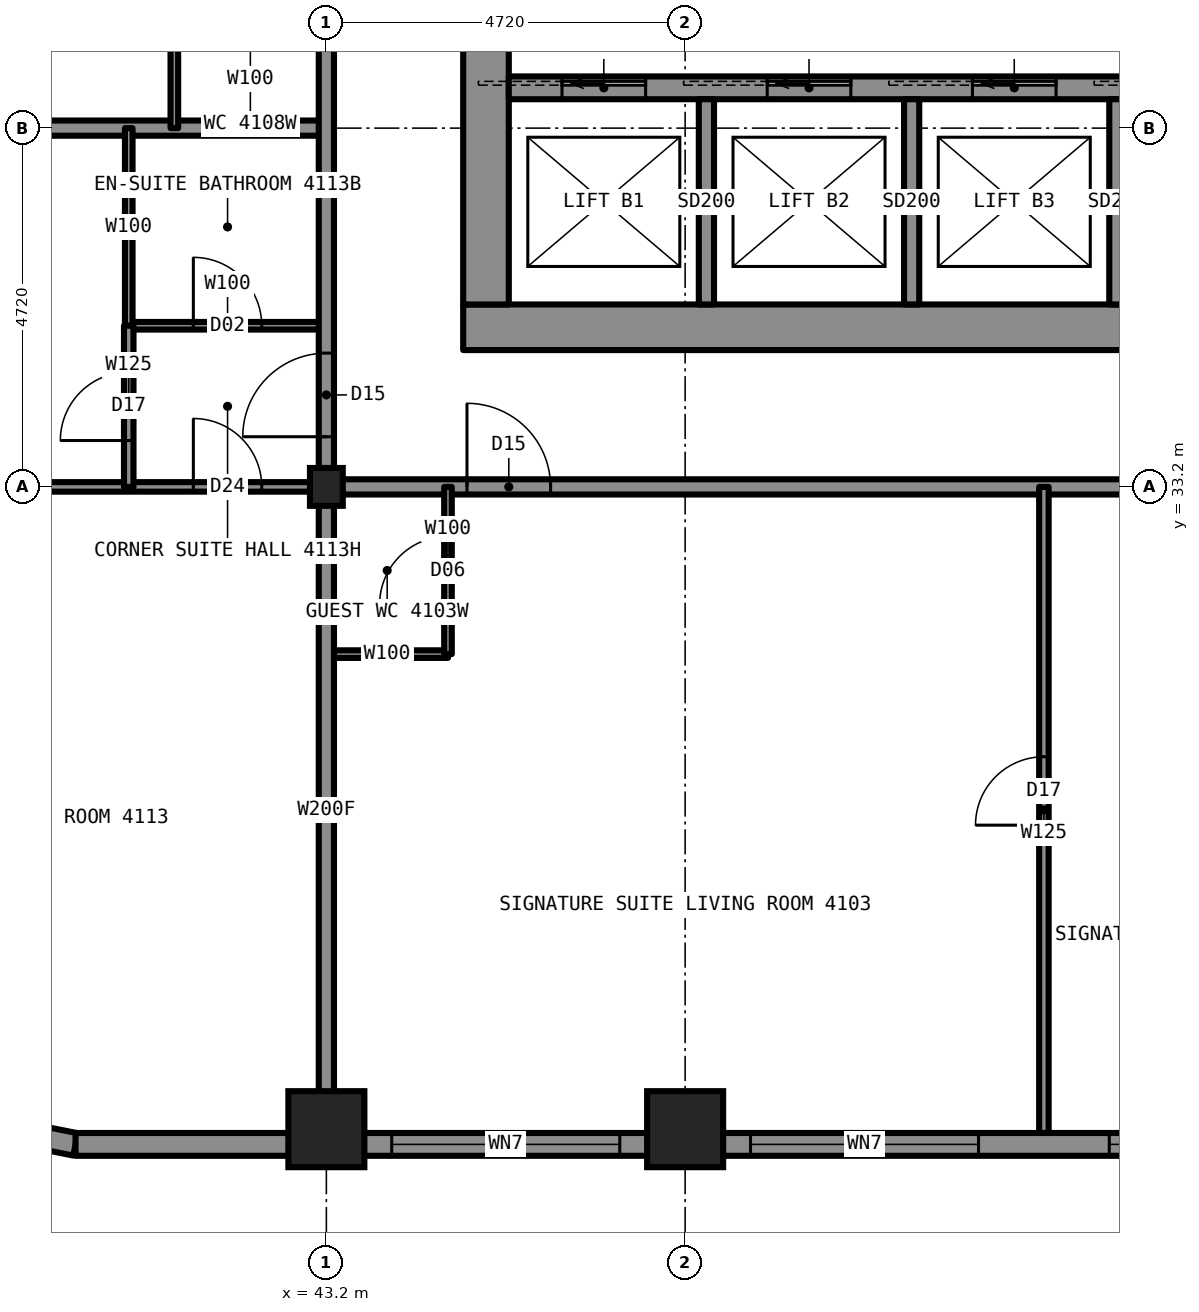
"""IFC4 building model, lengths in metres.
Left out: names, types, materials, properties, quantities, classifications, styles, units other than length and angle.
Written with IfcOpenShell. Run it as: python <this file> out.ifc"""

import sys

from ifc_helpers import new_model, si_unit, direction, frame, frame_2d, origin, origin_2d, place, context, subcontext, project, spatial, rectangle, i_section, extrude, element, fill, save


model = new_model("IFC4")
c1 = context("Model", 3, precision=1e-05, world=origin(), true_north=direction((0.0, 1.0)))
c2 = subcontext(c1, "Body", "Model", "MODEL_VIEW")
j1 = project(units=[si_unit("LENGTHUNIT", "METRE"), si_unit("PLANEANGLEUNIT", "RADIAN")], contexts=[c1])
p1 = place(None, origin())
s1 = spatial("IfcSite", under=j1, at=p1, CompositionType="ELEMENT")
p2 = place(p1, origin())
s2 = spatial("IfcBuilding", under=s1, at=p2, CompositionType="ELEMENT")
p3 = place(p2, frame((0.0, 0.0, 145.9)))
s3 = spatial("IfcBuildingStorey", under=s2, at=p3, CompositionType="ELEMENT", Elevation=145.9)
for number, where, z_axis, x_axis in (
    (1, (43.2, 24.75, 0.0), (0.0, 0.0, 1.0), (1.0, 0.0, 0.0)),
    (2, (47.92, 24.75, 0.0), (0.0, 0.0, 1.0), (1.0, 0.0, 0.0)),
):
    element("IfcColumn", number, at=place(p3, frame(where, z_axis=z_axis, x_axis=x_axis)), inside=s3, PredefinedType="COLUMN", context=c2, shape_type="SweptSolid", body=[
        extrude(i_section(OverallWidth=0.422, OverallDepth=0.465, WebThickness=0.045, FlangeThickness=0.073, at=origin_2d()), origin(), (0.0, 0.0, 1.0), 3.5),
    ])
p4 = place(p3, frame((43.2, 33.2, 0.0), z_axis=(0.0, 0.0, 1.0), x_axis=(1.0, 0.0, 0.0)))
e3 = element("IfcColumn", 3, at=p4, inside=s3, PredefinedType="COLUMN", context=c2, shape_type="SweptSolid", body=[
    extrude(i_section(OverallWidth=0.432, OverallDepth=0.498, WebThickness=0.056, FlangeThickness=0.089, at=origin_2d()), origin(), (0.0, 0.0, 1.0), 3.5),
])
p5 = place(p3, frame((45.0, 35.3, 0.0), z_axis=(0.0, 0.0, 1.0), x_axis=(1.0, 0.0, 0.0)))
e4 = element("IfcWall", 4, at=p5, inside=s3, PredefinedType="SHEAR", context=c2, shape_type="SweptSolid", body=[
    extrude(rectangle(XDim=20.0, YDim=0.6, at=frame_2d((10.0, 0.0))), origin(), (0.0, 0.0, 1.0), 3.5),
])
p6 = place(p3, frame((45.3, 35.6, 0.0), z_axis=(0.0, 0.0, 1.0), x_axis=(0.0, 1.0, 0.0)))
e5 = element("IfcWall", 5, at=p6, inside=s3, PredefinedType="SHEAR", context=c2, shape_type="SweptSolid", body=[
    extrude(rectangle(XDim=18.8, YDim=0.6, at=frame_2d((9.4, 0.0))), origin(), (0.0, 0.0, 1.0), 3.5),
])
p7 = place(p6, frame((13.4, 0.0, 0.0)))
e6 = element("IfcOpeningElement", 6, at=p7, cuts=e5, PredefinedType="OPENING", context=c2, shape_type="SweptSolid", body=[
    extrude(rectangle(XDim=1.8, YDim=2.2, at=frame_2d((0.9, 1.1))), frame((0.0, 0.31, 0.0), z_axis=(0.0, -1.0, 0.0), x_axis=(1.0, 0.0, 0.0)), (0.0, 0.0, 1.0), 0.62),
])
p8 = place(p6, frame((3.6, 0.0, 0.0)))
e7 = element("IfcOpeningElement", 7, at=p8, cuts=e5, PredefinedType="OPENING", context=c2, shape_type="SweptSolid", body=[
    extrude(rectangle(XDim=1.8, YDim=2.2, at=frame_2d((0.9, 1.1))), frame((0.0, 0.31, 0.0), z_axis=(0.0, -1.0, 0.0), x_axis=(1.0, 0.0, 0.0)), (0.0, 0.0, 1.0), 0.62),
])
p9 = place(p6, frame((6.4, 0.0, 0.0)))
e8 = element("IfcOpeningElement", 8, at=p9, cuts=e5, PredefinedType="OPENING", context=c2, shape_type="SweptSolid", body=[
    extrude(rectangle(XDim=1.2, YDim=2.2, at=frame_2d((0.6, 1.1))), frame((0.0, 0.31, 0.0), z_axis=(0.0, -1.0, 0.0), x_axis=(1.0, 0.0, 0.0)), (0.0, 0.0, 1.0), 0.62),
])
p10 = place(p3, frame((45.6, 38.45, 0.0), z_axis=(0.0, 0.0, 1.0), x_axis=(1.0, 0.0, 0.0)))
e9 = element("IfcWall", 9, at=p10, inside=s3, PredefinedType="SHEAR", context=c2, shape_type="SweptSolid", body=[
    extrude(rectangle(XDim=18.8, YDim=0.3, at=frame_2d((9.4, 0.0))), origin(), (0.0, 0.0, 1.0), 3.5),
])
p11 = place(p3, frame((43.2, 33.2, 0.0), z_axis=(0.0, 0.0, 1.0), x_axis=(1.0, 0.0, 0.0)))
e10 = element("IfcWall", 10, at=p11, inside=s3, PredefinedType="PARTITIONING", context=c2, shape_type="SweptSolid", body=[
    extrude(rectangle(XDim=23.6, YDim=0.2, at=frame_2d((11.8, 0.0))), origin(), (0.0, 0.0, 1.0), 3.33),
])
p12 = place(p11, frame((1.85, 0.0, 0.0)))
e11 = element("IfcOpeningElement", 11, at=p12, cuts=e10, PredefinedType="OPENING", context=c2, shape_type="SweptSolid", body=[
    extrude(rectangle(XDim=1.1, YDim=2.2, at=frame_2d((0.55, 1.1))), frame((0.0, 0.11, 0.0), z_axis=(0.0, -1.0, 0.0), x_axis=(1.0, 0.0, 0.0)), (0.0, 0.0, 1.0), 0.22),
])
p13 = place(p11, frame((17.16, 0.0, 0.0)))
e12 = element("IfcOpeningElement", 12, at=p13, cuts=e10, PredefinedType="OPENING", context=c2, shape_type="SweptSolid", body=[
    extrude(rectangle(XDim=1.0, YDim=2.2, at=frame_2d((0.5, 1.1))), frame((0.0, 0.11, 0.0), z_axis=(0.0, -1.0, 0.0), x_axis=(1.0, 0.0, 0.0)), (0.0, 0.0, 1.0), 0.22),
])
p14 = place(p3, frame((34.7, 33.2, 0.0), z_axis=(0.0, 0.0, 1.0), x_axis=(1.0, 0.0, 0.0)))
e13 = element("IfcWall", 13, at=p14, inside=s3, PredefinedType="PARTITIONING", context=c2, shape_type="SweptSolid", body=[
    extrude(rectangle(XDim=8.5, YDim=0.125, at=frame_2d((4.25, 0.0))), origin(), (0.0, 0.0, 1.0), 2.573),
])
p15 = place(p14, frame((6.75, 0.0, 0.0)))
e14 = element("IfcOpeningElement", 14, at=p15, cuts=e13, PredefinedType="OPENING", context=c2, shape_type="SweptSolid", body=[
    extrude(rectangle(XDim=0.9, YDim=2.2, at=frame_2d((0.45, 1.1))), frame((0.0, 0.073, 0.0), z_axis=(0.0, -1.0, 0.0), x_axis=(1.0, 0.0, 0.0)), (0.0, 0.0, 1.0), 0.145),
])
p16 = place(p3, frame((43.2, 31.0, 0.0), z_axis=(0.0, 0.0, 1.0), x_axis=(1.0, 0.0, 0.0)))
e15 = element("IfcWall", 15, at=p16, inside=s3, PredefinedType="PARTITIONING", context=c2, shape_type="SweptSolid", body=[
    extrude(rectangle(XDim=1.6, YDim=0.1, at=frame_2d((0.8, 0.0))), origin(), (0.0, 0.0, 1.0), 3.33),
])
p17 = place(p3, frame((42.6, 37.92, 0.0), z_axis=(0.0, 0.0, 1.0), x_axis=(1.0, 0.0, 0.0)))
e16 = element("IfcWall", 16, at=p17, inside=s3, PredefinedType="PARTITIONING", context=c2, shape_type="SweptSolid", body=[
    extrude(rectangle(XDim=0.6, YDim=0.2, at=frame_2d((0.3, 0.0))), origin(), (0.0, 0.0, 1.0), 2.573),
])
p18 = place(p3, frame((34.7, 37.92, 0.0), z_axis=(0.0, 0.0, 1.0), x_axis=(1.0, 0.0, 0.0)))
e17 = element("IfcWall", 17, at=p18, inside=s3, PredefinedType="PARTITIONING", context=c2, shape_type="SweptSolid", body=[
    extrude(rectangle(XDim=7.9, YDim=0.2, at=frame_2d((3.95, 0.0))), origin(), (0.0, 0.0, 1.0), 2.573),
])
p19 = place(p3, frame((40.6, 35.32, 0.0), z_axis=(0.0, 0.0, 1.0), x_axis=(1.0, 0.0, 0.0)))
e18 = element("IfcWall", 18, at=p19, inside=s3, PredefinedType="PARTITIONING", context=c2, shape_type="SweptSolid", body=[
    extrude(rectangle(XDim=2.6, YDim=0.1, at=frame_2d((1.3, 0.0))), origin(), (0.0, 0.0, 1.0), 3.33),
])
p20 = place(p19, frame((0.85, 0.0, 0.0)))
e19 = element("IfcOpeningElement", 19, at=p20, cuts=e18, PredefinedType="OPENING", context=c2, shape_type="SweptSolid", body=[
    extrude(rectangle(XDim=0.9, YDim=2.1, at=frame_2d((0.45, 1.05))), frame((0.0, 0.06, 0.0), z_axis=(0.0, -1.0, 0.0), x_axis=(1.0, 0.0, 0.0)), (0.0, 0.0, 1.0), 0.12),
])
p21 = place(p3, frame((44.8, 31.0, 0.0), z_axis=(0.0, 0.0, 1.0), x_axis=(0.0, 1.0, 0.0)))
e20 = element("IfcWall", 20, at=p21, inside=s3, PredefinedType="PARTITIONING", context=c2, shape_type="SweptSolid", body=[
    extrude(rectangle(XDim=2.2, YDim=0.1, at=frame_2d((1.1, 0.0))), origin(), (0.0, 0.0, 1.0), 3.33),
])
p22 = place(p21, frame((0.65, 0.0, 0.0)))
e21 = element("IfcOpeningElement", 21, at=p22, cuts=e20, PredefinedType="OPENING", context=c2, shape_type="SweptSolid", body=[
    extrude(rectangle(XDim=0.9, YDim=2.1, at=frame_2d((0.45, 1.05))), frame((0.0, 0.06, 0.0), z_axis=(0.0, -1.0, 0.0), x_axis=(1.0, 0.0, 0.0)), (0.0, 0.0, 1.0), 0.12),
])
p23 = place(p3, frame((43.2, 33.2, 0.0), z_axis=(0.0, 0.0, 1.0), x_axis=(0.0, 1.0, 0.0)))
e22 = element("IfcWall", 22, at=p23, inside=s3, PredefinedType="PARTITIONING", context=c2, shape_type="SweptSolid", body=[
    extrude(rectangle(XDim=4.72, YDim=0.2, at=frame_2d((2.36, 0.0))), origin(), (0.0, 0.0, 1.0), 3.33),
])
p24 = place(p23, frame((0.66, 0.0, 0.0)))
e23 = element("IfcOpeningElement", 23, at=p24, cuts=e22, PredefinedType="OPENING", context=c2, shape_type="SweptSolid", body=[
    extrude(rectangle(XDim=1.1, YDim=2.2, at=frame_2d((0.55, 1.1))), frame((0.0, 0.11, 0.0), z_axis=(0.0, -1.0, 0.0), x_axis=(1.0, 0.0, 0.0)), (0.0, 0.0, 1.0), 0.22),
])
p25 = place(p3, frame((43.2, 24.7, 0.0), z_axis=(0.0, 0.0, 1.0), x_axis=(0.0, 1.0, 0.0)))
e24 = element("IfcWall", 24, at=p25, inside=s3, PredefinedType="PARTITIONING", context=c2, shape_type="SweptSolid", body=[
    extrude(rectangle(XDim=8.5, YDim=0.2, at=frame_2d((4.25, 0.0))), origin(), (0.0, 0.0, 1.0), 2.573),
])
p26 = place(p3, frame((42.6, 37.92, 0.0), z_axis=(0.0, 0.0, 1.0), x_axis=(0.0, 1.0, 0.0)))
e25 = element("IfcWall", 25, at=p26, inside=s3, PredefinedType="PARTITIONING", context=c2, shape_type="SweptSolid", body=[
    extrude(rectangle(XDim=14.16, YDim=0.2, at=frame_2d((7.08, 0.0))), origin(), (0.0, 0.0, 1.0), 3.33),
])
p27 = place(p26, frame((1.46, 0.0, 0.0)))
e26 = element("IfcOpeningElement", 26, at=p27, cuts=e25, PredefinedType="OPENING", context=c2, shape_type="SweptSolid", body=[
    extrude(rectangle(XDim=1.0, YDim=2.2, at=frame_2d((0.5, 1.1))), frame((0.0, 0.11, 0.0), z_axis=(0.0, -1.0, 0.0), x_axis=(1.0, 0.0, 0.0)), (0.0, 0.0, 1.0), 0.22),
])
p28 = place(p26, frame((6.18, 0.0, 0.0)))
e27 = element("IfcOpeningElement", 27, at=p28, cuts=e25, PredefinedType="OPENING", context=c2, shape_type="SweptSolid", body=[
    extrude(rectangle(XDim=1.0, YDim=2.2, at=frame_2d((0.5, 1.1))), frame((0.0, 0.11, 0.0), z_axis=(0.0, -1.0, 0.0), x_axis=(1.0, 0.0, 0.0)), (0.0, 0.0, 1.0), 0.22),
])
p29 = place(p26, frame((11.7, 0.0, 0.0)))
e28 = element("IfcOpeningElement", 28, at=p29, cuts=e25, PredefinedType="OPENING", context=c2, shape_type="SweptSolid", body=[
    extrude(rectangle(XDim=1.0, YDim=2.2, at=frame_2d((0.5, 1.1))), frame((0.0, 0.11, 0.0), z_axis=(0.0, -1.0, 0.0), x_axis=(1.0, 0.0, 0.0)), (0.0, 0.0, 1.0), 0.22),
])
p30 = place(p3, frame((40.6, 35.32, 0.0), z_axis=(0.0, 0.0, 1.0), x_axis=(0.0, 1.0, 0.0)))
e29 = element("IfcWall", 29, at=p30, inside=s3, PredefinedType="PARTITIONING", context=c2, shape_type="SweptSolid", body=[
    extrude(rectangle(XDim=3.8, YDim=0.1, at=frame_2d((1.9, 0.0))), origin(), (0.0, 0.0, 1.0), 3.33),
])
p31 = place(p3, frame((40.6, 33.2, 0.0), z_axis=(0.0, 0.0, 1.0), x_axis=(0.0, 1.0, 0.0)))
e30 = element("IfcWall", 30, at=p31, inside=s3, PredefinedType="PARTITIONING", context=c2, shape_type="SweptSolid", body=[
    extrude(rectangle(XDim=2.12, YDim=0.125, at=frame_2d((1.06, 0.0))), origin(), (0.0, 0.0, 1.0), 3.33),
])
p32 = place(p31, frame((0.61, 0.0, 0.0)))
e31 = element("IfcOpeningElement", 31, at=p32, cuts=e30, PredefinedType="OPENING", context=c2, shape_type="SweptSolid", body=[
    extrude(rectangle(XDim=0.9, YDim=2.2, at=frame_2d((0.45, 1.1))), frame((0.0, 0.073, 0.0), z_axis=(0.0, -1.0, 0.0), x_axis=(1.0, 0.0, 0.0)), (0.0, 0.0, 1.0), 0.145),
])
p33 = place(p3, frame((52.64, 24.7, 0.0), z_axis=(0.0, 0.0, 1.0), x_axis=(0.0, 1.0, 0.0)))
e32 = element("IfcWall", 32, at=p33, inside=s3, PredefinedType="PARTITIONING", context=c2, shape_type="SweptSolid", body=[
    extrude(rectangle(XDim=8.5, YDim=0.125, at=frame_2d((4.25, 0.0))), origin(), (0.0, 0.0, 1.0), 3.33),
])
p34 = place(p33, frame((4.05, 0.0, 0.0)))
e33 = element("IfcOpeningElement", 33, at=p34, cuts=e32, PredefinedType="OPENING", context=c2, shape_type="SweptSolid", body=[
    extrude(rectangle(XDim=0.9, YDim=2.2, at=frame_2d((0.45, 1.1))), frame((0.0, 0.073, 0.0), z_axis=(0.0, -1.0, 0.0), x_axis=(1.0, 0.0, 0.0)), (0.0, 0.0, 1.0), 0.145),
])
p35 = place(p3, frame((37.853, 24.957, 0.0), z_axis=(0.0, 0.0, 1.0), x_axis=(0.980787050784, -0.195081421501, 0.0)))
e34 = element("IfcWall", 34, at=p35, inside=s3, PredefinedType="SOLIDWALL", context=c2, shape_type="SweptSolid", body=[
    extrude(rectangle(XDim=2.087, YDim=0.3, at=frame_2d((1.044, 0.0))), origin(), (0.0, 0.0, 1.0), 3.33),
])
p36 = place(p35, frame((0.444, 0.0, 0.5)))
e35 = element("IfcOpeningElement", 35, at=p36, cuts=e34, PredefinedType="OPENING", context=c2, shape_type="SweptSolid", body=[
    extrude(rectangle(XDim=0.7, YDim=1.0, at=frame_2d((0.35, 0.5))), frame((0.0, 0.16, 0.0), z_axis=(0.0, -1.0, 0.0), x_axis=(1.0, 0.0, 0.0)), (0.0, 0.0, 1.0), 0.32),
])
p37 = place(p3, frame((39.9, 24.55, 0.0), z_axis=(0.0, 0.0, 1.0), x_axis=(1.0, 0.0, 0.0)))
e36 = element("IfcWall", 36, at=p37, inside=s3, PredefinedType="SOLIDWALL", context=c2, shape_type="SweptSolid", body=[
    extrude(rectangle(XDim=30.2, YDim=0.3, at=frame_2d((15.1, 0.0))), origin(), (0.0, 0.0, 1.0), 2.83),
])
p38 = place(p37, frame((1.3, 0.0, 0.8)))
e37 = element("IfcOpeningElement", 37, at=p38, cuts=e36, PredefinedType="OPENING", context=c2, shape_type="SweptSolid", body=[
    extrude(rectangle(XDim=1.1, YDim=1.7, at=frame_2d((0.55, 0.85))), frame((0.0, 0.16, 0.0), z_axis=(0.0, -1.0, 0.0), x_axis=(1.0, 0.0, 0.0)), (0.0, 0.0, 1.0), 0.32),
])
p39 = place(p37, frame((4.16, 0.0, 0.5)))
e38 = element("IfcOpeningElement", 38, at=p39, cuts=e36, PredefinedType="OPENING", context=c2, shape_type="SweptSolid", body=[
    extrude(rectangle(XDim=3.0, YDim=2.0, at=frame_2d((1.5, 1.0))), frame((0.0, 0.16, 0.0), z_axis=(0.0, -1.0, 0.0), x_axis=(1.0, 0.0, 0.0)), (0.0, 0.0, 1.0), 0.32),
])
p40 = place(p37, frame((8.88, 0.0, 0.5)))
e39 = element("IfcOpeningElement", 39, at=p40, cuts=e36, PredefinedType="OPENING", context=c2, shape_type="SweptSolid", body=[
    extrude(rectangle(XDim=3.0, YDim=2.0, at=frame_2d((1.5, 1.0))), frame((0.0, 0.16, 0.0), z_axis=(0.0, -1.0, 0.0), x_axis=(1.0, 0.0, 0.0)), (0.0, 0.0, 1.0), 0.32),
])
p41 = place(p37, frame((13.6, 0.0, 0.5)))
e40 = element("IfcOpeningElement", 40, at=p41, cuts=e36, PredefinedType="OPENING", context=c2, shape_type="SweptSolid", body=[
    extrude(rectangle(XDim=3.0, YDim=2.0, at=frame_2d((1.5, 1.0))), frame((0.0, 0.16, 0.0), z_axis=(0.0, -1.0, 0.0), x_axis=(1.0, 0.0, 0.0)), (0.0, 0.0, 1.0), 0.32),
])
p42 = place(p37, frame((18.32, 0.0, 0.5)))
e41 = element("IfcOpeningElement", 41, at=p42, cuts=e36, PredefinedType="OPENING", context=c2, shape_type="SweptSolid", body=[
    extrude(rectangle(XDim=3.0, YDim=2.0, at=frame_2d((1.5, 1.0))), frame((0.0, 0.16, 0.0), z_axis=(0.0, -1.0, 0.0), x_axis=(1.0, 0.0, 0.0)), (0.0, 0.0, 1.0), 0.32),
])
p43 = place(p37, frame((23.04, 0.0, 0.5)))
e42 = element("IfcOpeningElement", 42, at=p43, cuts=e36, PredefinedType="OPENING", context=c2, shape_type="SweptSolid", body=[
    extrude(rectangle(XDim=3.0, YDim=2.0, at=frame_2d((1.5, 1.0))), frame((0.0, 0.16, 0.0), z_axis=(0.0, -1.0, 0.0), x_axis=(1.0, 0.0, 0.0)), (0.0, 0.0, 1.0), 0.32),
])
p44 = place(p37, frame((27.75, 0.0, 0.8)))
e43 = element("IfcOpeningElement", 43, at=p44, cuts=e36, PredefinedType="OPENING", context=c2, shape_type="SweptSolid", body=[
    extrude(rectangle(XDim=1.1, YDim=1.7, at=frame_2d((0.55, 0.85))), frame((0.0, 0.16, 0.0), z_axis=(0.0, -1.0, 0.0), x_axis=(1.0, 0.0, 0.0)), (0.0, 0.0, 1.0), 0.32),
])
for number, where, z_axis, x_axis in (
    (44, (48.2, 35.6, 0.0), (0.0, 0.0, 1.0), (0.0, 1.0, 0.0)),
    (45, (50.9, 35.6, 0.0), (0.0, 0.0, 1.0), (0.0, 1.0, 0.0)),
    (46, (53.6, 35.6, 0.0), (0.0, 0.0, 1.0), (0.0, 1.0, 0.0)),
):
    element("IfcWall", number, at=place(p3, frame(where, z_axis=z_axis, x_axis=x_axis)), inside=s3, PredefinedType="PARTITIONING", context=c2, shape_type="SweptSolid", body=[
        extrude(rectangle(XDim=2.7, YDim=0.2, at=frame_2d((1.35, 0.0))), origin(), (0.0, 0.0, 1.0), 3.33),
    ])
p45 = place(p12, origin())
e47 = element("IfcDoor", 47, at=p45, inside=s3, OperationType="SINGLE_SWING_LEFT", PredefinedType="DOOR", context=c2, shape_type="SweptSolid", body=[
    extrude(rectangle(XDim=1.1, YDim=2.2, at=frame_2d((0.55, 1.1))), frame((0.0, 0.025, 0.0), z_axis=(0.0, -1.0, 0.0), x_axis=(1.0, 0.0, 0.0)), (0.0, 0.0, 1.0), 0.05),
])
fill(e11, e47)
p46 = place(p34, origin())
e48 = element("IfcDoor", 48, at=p46, inside=s3, OperationType="SINGLE_SWING_LEFT", PredefinedType="DOOR", context=c2, shape_type="SweptSolid", body=[
    extrude(rectangle(XDim=0.9, YDim=2.2, at=frame_2d((0.45, 1.1))), frame((0.0, 0.025, 0.0), z_axis=(0.0, -1.0, 0.0), x_axis=(1.0, 0.0, 0.0)), (0.0, 0.0, 1.0), 0.05),
])
fill(e33, e48)
p47 = place(p22, origin())
e49 = element("IfcDoor", 49, at=p47, inside=s3, OperationType="SINGLE_SWING_LEFT", PredefinedType="DOOR", context=c2, shape_type="SweptSolid", body=[
    extrude(rectangle(XDim=0.9, YDim=2.1, at=frame_2d((0.45, 1.05))), frame((0.0, 0.025, 0.0), z_axis=(0.0, -1.0, 0.0), x_axis=(1.0, 0.0, 0.0)), (0.0, 0.0, 1.0), 0.05),
])
fill(e21, e49)
p48 = place(p15, origin())
e50 = element("IfcDoor", 50, at=p48, inside=s3, OperationType="SINGLE_SWING_LEFT", PredefinedType="DOOR", context=c2, shape_type="SweptSolid", body=[
    extrude(rectangle(XDim=0.9, YDim=2.2, at=frame_2d((0.45, 1.1))), frame((0.0, 0.025, 0.0), z_axis=(0.0, -1.0, 0.0), x_axis=(1.0, 0.0, 0.0)), (0.0, 0.0, 1.0), 0.05),
])
fill(e14, e50)
p49 = place(p20, origin())
e51 = element("IfcDoor", 51, at=p49, inside=s3, OperationType="SINGLE_SWING_RIGHT", PredefinedType="DOOR", context=c2, shape_type="SweptSolid", body=[
    extrude(rectangle(XDim=0.9, YDim=2.1, at=frame_2d((0.45, 1.05))), frame((0.0, 0.025, 0.0), z_axis=(0.0, -1.0, 0.0), x_axis=(1.0, 0.0, 0.0)), (0.0, 0.0, 1.0), 0.05),
])
fill(e19, e51)
p50 = place(p24, origin())
e52 = element("IfcDoor", 52, at=p50, inside=s3, OperationType="SINGLE_SWING_LEFT", PredefinedType="DOOR", context=c2, shape_type="SweptSolid", body=[
    extrude(rectangle(XDim=1.1, YDim=2.2, at=frame_2d((0.55, 1.1))), frame((0.0, 0.025, 0.0), z_axis=(0.0, -1.0, 0.0), x_axis=(1.0, 0.0, 0.0)), (0.0, 0.0, 1.0), 0.05),
])
fill(e23, e52)
p51 = place(p32, origin())
e53 = element("IfcDoor", 53, at=p51, inside=s3, OperationType="SINGLE_SWING_LEFT", PredefinedType="DOOR", context=c2, shape_type="SweptSolid", body=[
    extrude(rectangle(XDim=0.9, YDim=2.2, at=frame_2d((0.45, 1.1))), frame((0.0, 0.025, 0.0), z_axis=(0.0, -1.0, 0.0), x_axis=(1.0, 0.0, 0.0)), (0.0, 0.0, 1.0), 0.05),
])
fill(e31, e53)
p52 = place(p38, origin())
e54 = element("IfcWindow", 54, at=p52, inside=s3, PartitioningType="SINGLE_PANEL", PredefinedType="WINDOW", context=c2, shape_type="SweptSolid", body=[
    extrude(rectangle(XDim=1.1, YDim=1.7, at=frame_2d((0.55, 0.85))), frame((0.0, 0.03, 0.0), z_axis=(0.0, -1.0, 0.0), x_axis=(1.0, 0.0, 0.0)), (0.0, 0.0, 1.0), 0.06),
])
fill(e37, e54)
p53 = place(p39, origin())
e55 = element("IfcWindow", 55, at=p53, inside=s3, PartitioningType="SINGLE_PANEL", PredefinedType="WINDOW", context=c2, shape_type="SweptSolid", body=[
    extrude(rectangle(XDim=3.0, YDim=2.0, at=frame_2d((1.5, 1.0))), frame((0.0, 0.03, 0.0), z_axis=(0.0, -1.0, 0.0), x_axis=(1.0, 0.0, 0.0)), (0.0, 0.0, 1.0), 0.06),
])
fill(e38, e55)
p54 = place(p40, origin())
e56 = element("IfcWindow", 56, at=p54, inside=s3, PartitioningType="SINGLE_PANEL", PredefinedType="WINDOW", context=c2, shape_type="SweptSolid", body=[
    extrude(rectangle(XDim=3.0, YDim=2.0, at=frame_2d((1.5, 1.0))), frame((0.0, 0.03, 0.0), z_axis=(0.0, -1.0, 0.0), x_axis=(1.0, 0.0, 0.0)), (0.0, 0.0, 1.0), 0.06),
])
fill(e39, e56)
p55 = place(p41, origin())
e57 = element("IfcWindow", 57, at=p55, inside=s3, PartitioningType="SINGLE_PANEL", PredefinedType="WINDOW", context=c2, shape_type="SweptSolid", body=[
    extrude(rectangle(XDim=3.0, YDim=2.0, at=frame_2d((1.5, 1.0))), frame((0.0, 0.03, 0.0), z_axis=(0.0, -1.0, 0.0), x_axis=(1.0, 0.0, 0.0)), (0.0, 0.0, 1.0), 0.06),
])
fill(e40, e57)
save(model, sys.argv[1])
